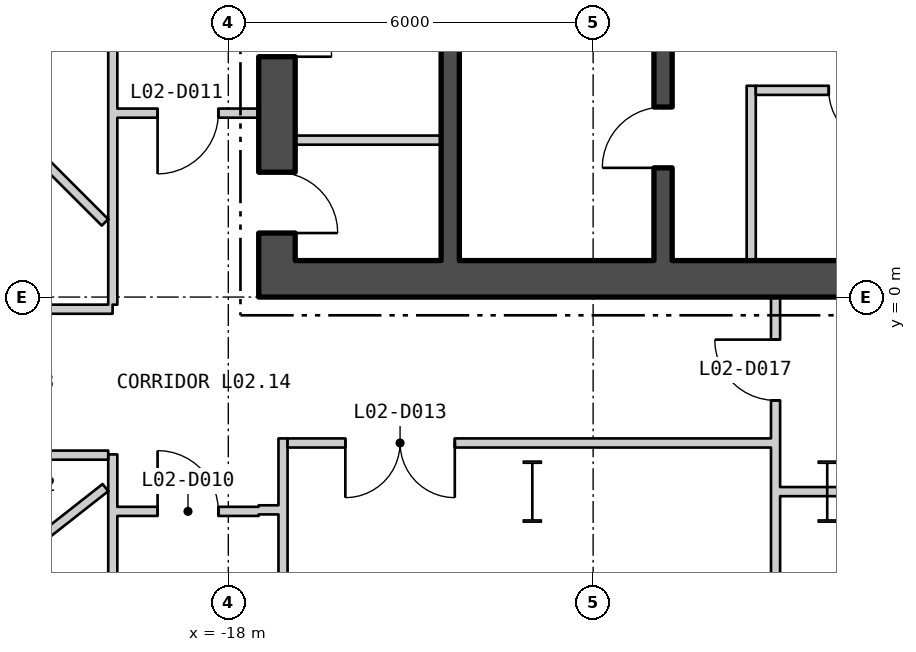
"""IFC4 building model, lengths in metres.
Left out: names, types, materials, properties, quantities, classifications, styles, units other than length and angle.
Written with IfcOpenShell. Run it as: python <this file> out.ifc"""

import sys

from ifc_helpers import new_model, si_unit, direction, frame, frame_2d, origin, origin_2d, place, context, subcontext, project, spatial, rectangle, i_section, extrude, element, fill, save


model = new_model("IFC4")
c1 = context("Model", 3, precision=1e-05, world=origin(), true_north=direction((0.0, 1.0)))
c2 = subcontext(c1, "Body", "Model", "MODEL_VIEW")
j1 = project(units=[si_unit("LENGTHUNIT", "METRE"), si_unit("PLANEANGLEUNIT", "RADIAN")], contexts=[c1])
p1 = place(None, origin())
s1 = spatial("IfcSite", under=j1, at=p1, CompositionType="ELEMENT")
p2 = place(p1, origin())
s2 = spatial("IfcBuilding", under=s1, at=p2, CompositionType="ELEMENT")
p3 = place(p2, frame((0.0, 0.0, 13.5)))
s3 = spatial("IfcBuildingStorey", under=s2, at=p3, CompositionType="ELEMENT", Elevation=13.5)
for number, where, z_axis, x_axis in (
    (1, (-8.15, -3.2, 0.0), (0.0, 0.0, 1.0), (1.0, 0.0, 0.0)),
    (2, (-13.0, -3.2, 0.0), (0.0, 0.0, 1.0), (1.0, 0.0, 0.0)),
):
    element("IfcColumn", number, at=place(p3, frame(where, z_axis=z_axis, x_axis=x_axis)), inside=s3, PredefinedType="COLUMN", context=c2, shape_type="SweptSolid", body=[
        extrude(i_section(OverallWidth=0.302, OverallDepth=1.008, WebThickness=0.021, FlangeThickness=0.04, at=origin_2d()), origin(), (0.0, 0.0, 1.0), 5.1),
    ])
p4 = place(p3, frame((-17.5, 0.3, 0.0), z_axis=(0.0, 0.0, 1.0), x_axis=(1.0, 0.0, 0.0)))
e3 = element("IfcWall", 3, at=p4, inside=s3, PredefinedType="SHEAR", context=c2, shape_type="SweptSolid", body=[
    extrude(rectangle(XDim=35.0, YDim=0.6, at=frame_2d((17.5, 0.0))), origin(), (0.0, 0.0, 1.0), 4.88),
])
p5 = place(p4, frame((12.0, 0.0, 0.0)))
e4 = element("IfcOpeningElement", 4, at=p5, cuts=e3, PredefinedType="OPENING", context=c2, shape_type="SweptSolid", body=[
    extrude(rectangle(XDim=1.8, YDim=2.4, at=frame_2d((0.9, 1.2))), frame((0.0, 0.31, 0.0), z_axis=(0.0, -1.0, 0.0), x_axis=(1.0, 0.0, 0.0)), (0.0, 0.0, 1.0), 0.62),
])
p6 = place(p4, frame((22.0, 0.0, 0.0)))
e5 = element("IfcOpeningElement", 5, at=p6, cuts=e3, PredefinedType="OPENING", context=c2, shape_type="SweptSolid", body=[
    extrude(rectangle(XDim=1.8, YDim=2.4, at=frame_2d((0.9, 1.2))), frame((0.0, 0.31, 0.0), z_axis=(0.0, -1.0, 0.0), x_axis=(1.0, 0.0, 0.0)), (0.0, 0.0, 1.0), 0.62),
])
p7 = place(p3, frame((-17.2, 0.6, 0.0), z_axis=(0.0, 0.0, 1.0), x_axis=(0.0, 1.0, 0.0)))
e6 = element("IfcWall", 6, at=p7, inside=s3, PredefinedType="SHEAR", context=c2, shape_type="SweptSolid", body=[
    extrude(rectangle(XDim=16.8, YDim=0.6, at=frame_2d((8.4, 0.0))), origin(), (0.0, 0.0, 1.0), 4.88),
])
p8 = place(p7, frame((5.7, 0.0, 0.0)))
e7 = element("IfcOpeningElement", 7, at=p8, cuts=e6, PredefinedType="OPENING", context=c2, shape_type="SweptSolid", body=[
    extrude(rectangle(XDim=1.5, YDim=2.1, at=frame_2d((0.75, 1.05))), frame((0.0, 0.31, 0.0), z_axis=(0.0, -1.0, 0.0), x_axis=(1.0, 0.0, 0.0)), (0.0, 0.0, 1.0), 0.62),
])
p9 = place(p7, frame((0.453, 0.0, 0.0)))
e8 = element("IfcOpeningElement", 8, at=p9, cuts=e6, PredefinedType="OPENING", context=c2, shape_type="SweptSolid", body=[
    extrude(rectangle(XDim=1.0, YDim=2.1, at=frame_2d((0.5, 1.05))), frame((0.0, 0.31, 0.0), z_axis=(0.0, -1.0, 0.0), x_axis=(1.0, 0.0, 0.0)), (0.0, 0.0, 1.0), 0.62),
])
p10 = place(p7, frame((3.353, 0.0, 0.0)))
e9 = element("IfcOpeningElement", 9, at=p10, cuts=e6, PredefinedType="OPENING", context=c2, shape_type="SweptSolid", body=[
    extrude(rectangle(XDim=0.9, YDim=2.1, at=frame_2d((0.45, 1.05))), frame((0.0, 0.31, 0.0), z_axis=(0.0, -1.0, 0.0), x_axis=(1.0, 0.0, 0.0)), (0.0, 0.0, 1.0), 0.62),
])
p11 = place(p7, frame((7.886, 0.0, 0.0)))
e10 = element("IfcOpeningElement", 10, at=p11, cuts=e6, PredefinedType="OPENING", context=c2, shape_type="SweptSolid", body=[
    extrude(rectangle(XDim=0.9, YDim=2.1, at=frame_2d((0.45, 1.05))), frame((0.0, 0.31, 0.0), z_axis=(0.0, -1.0, 0.0), x_axis=(1.0, 0.0, 0.0)), (0.0, 0.0, 1.0), 0.62),
])
p12 = place(p7, frame((12.686, 0.0, 0.0)))
e11 = element("IfcOpeningElement", 11, at=p12, cuts=e6, PredefinedType="OPENING", context=c2, shape_type="SweptSolid", body=[
    extrude(rectangle(XDim=0.9, YDim=2.1, at=frame_2d((0.45, 1.05))), frame((0.0, 0.31, 0.0), z_axis=(0.0, -1.0, 0.0), x_axis=(1.0, 0.0, 0.0)), (0.0, 0.0, 1.0), 0.62),
])
p13 = place(p3, frame((-10.85, 0.6, 0.0), z_axis=(0.0, 0.0, 1.0), x_axis=(0.0, 1.0, 0.0)))
e12 = element("IfcWall", 12, at=p13, inside=s3, PredefinedType="SHEAR", context=c2, shape_type="SweptSolid", body=[
    extrude(rectangle(XDim=16.8, YDim=0.3, at=frame_2d((8.4, 0.0))), origin(), (0.0, 0.0, 1.0), 4.88),
])
p14 = place(p13, frame((5.075, 0.0, 0.0)))
e13 = element("IfcOpeningElement", 13, at=p14, cuts=e12, PredefinedType="OPENING", context=c2, shape_type="SweptSolid", body=[
    extrude(rectangle(XDim=1.25, YDim=2.1, at=frame_2d((0.625, 1.05))), frame((0.0, 0.16, 0.0), z_axis=(0.0, -1.0, 0.0), x_axis=(1.0, 0.0, 0.0)), (0.0, 0.0, 1.0), 0.32),
])
p15 = place(p13, frame((1.525, 0.0, 0.0)))
e14 = element("IfcOpeningElement", 14, at=p15, cuts=e12, PredefinedType="OPENING", context=c2, shape_type="SweptSolid", body=[
    extrude(rectangle(XDim=1.0, YDim=2.1, at=frame_2d((0.5, 1.05))), frame((0.0, 0.16, 0.0), z_axis=(0.0, -1.0, 0.0), x_axis=(1.0, 0.0, 0.0)), (0.0, 0.0, 1.0), 0.32),
])
p16 = place(p3, frame((-14.35, 0.6, 0.0), z_axis=(0.0, 0.0, 1.0), x_axis=(0.0, 1.0, 0.0)))
e15 = element("IfcWall", 15, at=p16, inside=s3, PredefinedType="SHEAR", context=c2, shape_type="SweptSolid", body=[
    extrude(rectangle(XDim=16.8, YDim=0.3, at=frame_2d((8.4, 0.0))), origin(), (0.0, 0.0, 1.0), 4.88),
])
p17 = place(p16, frame((5.7, 0.0, 0.0)))
e16 = element("IfcOpeningElement", 16, at=p17, cuts=e15, PredefinedType="OPENING", context=c2, shape_type="SweptSolid", body=[
    extrude(rectangle(XDim=1.5, YDim=2.1, at=frame_2d((0.75, 1.05))), frame((0.0, 0.16, 0.0), z_axis=(0.0, -1.0, 0.0), x_axis=(1.0, 0.0, 0.0)), (0.0, 0.0, 1.0), 0.32),
])
p18 = place(p3, frame((-16.9, 2.581, 0.0), z_axis=(0.0, 0.0, 1.0), x_axis=(1.0, 0.0, 0.0)))
e17 = element("IfcWall", 17, at=p18, inside=s3, PredefinedType="PARTITIONING", context=c2, shape_type="SweptSolid", body=[
    extrude(rectangle(XDim=2.4, YDim=0.15, at=frame_2d((1.2, 0.0))), origin(), (0.0, 0.0, 1.0), 4.88),
])
p19 = place(p3, frame((-9.4, 0.6, 0.0), z_axis=(0.0, 0.0, 1.0), x_axis=(0.0, 1.0, 0.0)))
e18 = element("IfcWall", 18, at=p19, inside=s3, PredefinedType="PARTITIONING", context=c2, shape_type="SweptSolid", body=[
    extrude(rectangle(XDim=2.875, YDim=0.15, at=frame_2d((1.438, 0.0))), origin(), (0.0, 0.0, 1.0), 4.88),
])
p20 = place(p3, frame((-9.325, 3.4, 0.0), z_axis=(0.0, 0.0, 1.0), x_axis=(1.0, 0.0, 0.0)))
e19 = element("IfcWall", 19, at=p20, inside=s3, PredefinedType="PARTITIONING", context=c2, shape_type="SweptSolid", body=[
    extrude(rectangle(XDim=3.3, YDim=0.15, at=frame_2d((1.65, 0.0))), origin(), (0.0, 0.0, 1.0), 4.88),
])
p21 = place(p20, frame((1.2, 0.0, 0.0)))
e20 = element("IfcOpeningElement", 20, at=p21, cuts=e19, PredefinedType="OPENING", context=c2, shape_type="SweptSolid", body=[
    extrude(rectangle(XDim=0.9, YDim=2.1, at=frame_2d((0.45, 1.05))), frame((0.0, 0.085, 0.0), z_axis=(0.0, -1.0, 0.0), x_axis=(1.0, 0.0, 0.0)), (0.0, 0.0, 1.0), 0.17),
])
p22 = place(p3, frame((-26.75, -2.6, 0.0), z_axis=(0.0, 0.0, 1.0), x_axis=(1.0, 0.0, 0.0)))
e21 = element("IfcWall", 21, at=p22, inside=s3, PredefinedType="PARTITIONING", context=c2, shape_type="SweptSolid", body=[
    extrude(rectangle(XDim=6.775, YDim=0.15, at=frame_2d((3.388, 0.0))), origin(), (0.0, 0.0, 1.0), 4.88),
])
p23 = place(p22, frame((1.616, 0.0, 0.0)))
e22 = element("IfcOpeningElement", 22, at=p23, cuts=e21, PredefinedType="OPENING", context=c2, shape_type="SweptSolid", body=[
    extrude(rectangle(XDim=1.0, YDim=2.1, at=frame_2d((0.5, 1.05))), frame((0.0, 0.085, 0.0), z_axis=(0.0, -1.0, 0.0), x_axis=(1.0, 0.0, 0.0)), (0.0, 0.0, 1.0), 0.17),
])
p24 = place(p22, frame((4.658, 0.0, 0.0)))
e23 = element("IfcOpeningElement", 23, at=p24, cuts=e21, PredefinedType="OPENING", context=c2, shape_type="SweptSolid", body=[
    extrude(rectangle(XDim=1.0, YDim=2.1, at=frame_2d((0.5, 1.05))), frame((0.0, 0.085, 0.0), z_axis=(0.0, -1.0, 0.0), x_axis=(1.0, 0.0, 0.0)), (0.0, 0.0, 1.0), 0.17),
])
p25 = place(p3, frame((-25.425, -0.2, 0.0), z_axis=(0.0, 0.0, 1.0), x_axis=(1.0, 0.0, 0.0)))
e24 = element("IfcWall", 24, at=p25, inside=s3, PredefinedType="PARTITIONING", context=c2, shape_type="SweptSolid", body=[
    extrude(rectangle(XDim=5.522, YDim=0.15, at=frame_2d((2.761, 0.0))), origin(), (0.0, 0.0, 1.0), 4.88),
])
p26 = place(p25, frame((2.666, 0.0, 0.0)))
e25 = element("IfcOpeningElement", 25, at=p26, cuts=e24, PredefinedType="OPENING", context=c2, shape_type="SweptSolid", body=[
    extrude(rectangle(XDim=1.8, YDim=2.1, at=frame_2d((0.9, 1.05))), frame((0.0, 0.085, 0.0), z_axis=(0.0, -1.0, 0.0), x_axis=(1.0, 0.0, 0.0)), (0.0, 0.0, 1.0), 0.17),
])
p27 = place(p3, frame((-25.392, 6.592, 0.0), z_axis=(0.0, 0.0, 1.0), x_axis=(0.707106781187, -0.707106781187, 0.0)))
e26 = element("IfcWall", 26, at=p27, inside=s3, PredefinedType="PARTITIONING", context=c2, shape_type="SweptSolid", body=[
    extrude(rectangle(XDim=7.586, YDim=0.15, at=frame_2d((3.793, 0.0))), origin(), (0.0, 0.0, 1.0), 4.88),
])
p28 = place(p3, frame((-24.745, -6.846, 0.0), z_axis=(0.0, 0.0, 1.0), x_axis=(0.786295235231, 0.617850955372, 0.0)))
e27 = element("IfcWall", 27, at=p28, inside=s3, PredefinedType="PARTITIONING", context=c2, shape_type="SweptSolid", body=[
    extrude(rectangle(XDim=6.008, YDim=0.15, at=frame_2d((3.004, 0.0))), origin(), (0.0, 0.0, 1.0), 4.88),
])
p29 = place(p3, frame((-19.9, -23.775, 0.0), z_axis=(0.0, 0.0, 1.0), x_axis=(0.0, 1.0, 0.0)))
e28 = element("IfcWall", 28, at=p29, inside=s3, PredefinedType="PARTITIONING", context=c2, shape_type="SweptSolid", body=[
    extrude(rectangle(XDim=21.187, YDim=0.15, at=frame_2d((10.594, 0.0))), origin(), (0.0, 0.0, 1.0), 4.88),
])
p30 = place(p29, frame((3.898, 0.0, 0.0)))
e29 = element("IfcOpeningElement", 29, at=p30, cuts=e28, PredefinedType="OPENING", context=c2, shape_type="SweptSolid", body=[
    extrude(rectangle(XDim=1.0, YDim=2.1, at=frame_2d((0.5, 1.05))), frame((0.0, 0.085, 0.0), z_axis=(0.0, -1.0, 0.0), x_axis=(1.0, 0.0, 0.0)), (0.0, 0.0, 1.0), 0.17),
])
p31 = place(p29, frame((10.832, 0.0, 0.0)))
e30 = element("IfcOpeningElement", 30, at=p31, cuts=e28, PredefinedType="OPENING", context=c2, shape_type="SweptSolid", body=[
    extrude(rectangle(XDim=1.0, YDim=2.1, at=frame_2d((0.5, 1.05))), frame((0.0, 0.085, 0.0), z_axis=(0.0, -1.0, 0.0), x_axis=(1.0, 0.0, 0.0)), (0.0, 0.0, 1.0), 0.17),
])
p32 = place(p29, frame((14.688, 0.0, 0.0)))
e31 = element("IfcOpeningElement", 31, at=p32, cuts=e28, PredefinedType="OPENING", context=c2, shape_type="SweptSolid", body=[
    extrude(rectangle(XDim=1.0, YDim=2.1, at=frame_2d((0.5, 1.05))), frame((0.0, 0.085, 0.0), z_axis=(0.0, -1.0, 0.0), x_axis=(1.0, 0.0, 0.0)), (0.0, 0.0, 1.0), 0.17),
])
p33 = place(p3, frame((-19.9, -0.125, 0.0), z_axis=(0.0, 0.0, 1.0), x_axis=(0.0, 1.0, 0.0)))
e32 = element("IfcWall", 32, at=p33, inside=s3, PredefinedType="PARTITIONING", context=c2, shape_type="SweptSolid", body=[
    extrude(rectangle(XDim=1.15, YDim=0.15, at=frame_2d((0.575, 0.0))), origin(), (0.0, 0.0, 1.0), 4.88),
])
p34 = place(p3, frame((-19.9, 1.025, 0.0), z_axis=(0.0, 0.0, 1.0), x_axis=(0.0, 1.0, 0.0)))
e33 = element("IfcWall", 33, at=p34, inside=s3, PredefinedType="PARTITIONING", context=c2, shape_type="SweptSolid", body=[
    extrude(rectangle(XDim=16.9, YDim=0.15, at=frame_2d((8.45, 0.0))), origin(), (0.0, 0.0, 1.0), 4.88),
])
p35 = place(p34, frame((8.644, 0.0, 0.0)))
e34 = element("IfcOpeningElement", 34, at=p35, cuts=e33, PredefinedType="OPENING", context=c2, shape_type="SweptSolid", body=[
    extrude(rectangle(XDim=1.0, YDim=2.1, at=frame_2d((0.5, 1.05))), frame((0.0, 0.085, 0.0), z_axis=(0.0, -1.0, 0.0), x_axis=(1.0, 0.0, 0.0)), (0.0, 0.0, 1.0), 0.17),
])
p36 = place(p34, frame((15.7, 0.0, 0.0)))
e35 = element("IfcOpeningElement", 35, at=p36, cuts=e33, PredefinedType="OPENING", context=c2, shape_type="SweptSolid", body=[
    extrude(rectangle(XDim=1.0, YDim=2.1, at=frame_2d((0.5, 1.05))), frame((0.0, 0.085, 0.0), z_axis=(0.0, -1.0, 0.0), x_axis=(1.0, 0.0, 0.0)), (0.0, 0.0, 1.0), 0.17),
])
p37 = place(p3, frame((-19.825, -3.525, 0.0), z_axis=(0.0, 0.0, 1.0), x_axis=(1.0, 0.0, 0.0)))
e36 = element("IfcWall", 36, at=p37, inside=s3, PredefinedType="PARTITIONING", context=c2, shape_type="SweptSolid", body=[
    extrude(rectangle(XDim=2.325, YDim=0.15, at=frame_2d((1.163, 0.0))), origin(), (0.0, 0.0, 1.0), 4.88),
])
p38 = place(p37, frame((0.662, 0.0, 0.0)))
e37 = element("IfcOpeningElement", 37, at=p38, cuts=e36, PredefinedType="OPENING", context=c2, shape_type="SweptSolid", body=[
    extrude(rectangle(XDim=1.0, YDim=2.1, at=frame_2d((0.5, 1.05))), frame((0.0, 0.085, 0.0), z_axis=(0.0, -1.0, 0.0), x_axis=(1.0, 0.0, 0.0)), (0.0, 0.0, 1.0), 0.17),
])
p39 = place(p3, frame((-19.825, 3.025, 0.0), z_axis=(0.0, 0.0, 1.0), x_axis=(1.0, 0.0, 0.0)))
e38 = element("IfcWall", 38, at=p39, inside=s3, PredefinedType="PARTITIONING", context=c2, shape_type="SweptSolid", body=[
    extrude(rectangle(XDim=2.325, YDim=0.15, at=frame_2d((1.163, 0.0))), origin(), (0.0, 0.0, 1.0), 4.33),
])
p40 = place(p39, frame((0.662, 0.0, 0.0)))
e39 = element("IfcOpeningElement", 39, at=p40, cuts=e38, PredefinedType="OPENING", context=c2, shape_type="SweptSolid", body=[
    extrude(rectangle(XDim=1.0, YDim=2.1, at=frame_2d((0.5, 1.05))), frame((0.0, 0.085, 0.0), z_axis=(0.0, -1.0, 0.0), x_axis=(1.0, 0.0, 0.0)), (0.0, 0.0, 1.0), 0.17),
])
p41 = place(p3, frame((-17.5, -3.5, 0.0), z_axis=(0.0, 0.0, 1.0), x_axis=(1.0, 0.0, 0.0)))
e40 = element("IfcWall", 40, at=p41, inside=s3, PredefinedType="PARTITIONING", context=c2, shape_type="SweptSolid", body=[
    extrude(rectangle(XDim=0.325, YDim=0.15, at=frame_2d((0.163, 0.0))), origin(), (0.0, 0.0, 1.0), 4.88),
])
p42 = place(p3, frame((-17.1, -21.375, 0.0), z_axis=(0.0, 0.0, 1.0), x_axis=(0.0, 1.0, 0.0)))
e41 = element("IfcWall", 41, at=p42, inside=s3, PredefinedType="PARTITIONING", context=c2, shape_type="SweptSolid", body=[
    extrude(rectangle(XDim=19.05, YDim=0.15, at=frame_2d((9.525, 0.0))), origin(), (0.0, 0.0, 1.0), 4.88),
])
p43 = place(p3, frame((-17.025, -2.4, 0.0), z_axis=(0.0, 0.0, 1.0), x_axis=(1.0, 0.0, 0.0)))
e42 = element("IfcWall", 42, at=p43, inside=s3, PredefinedType="PARTITIONING", context=c2, shape_type="SweptSolid", body=[
    extrude(rectangle(XDim=7.95, YDim=0.15, at=frame_2d((3.975, 0.0))), origin(), (0.0, 0.0, 1.0), 4.88),
])
p44 = place(p43, frame((0.95, 0.0, 0.0)))
e43 = element("IfcOpeningElement", 43, at=p44, cuts=e42, PredefinedType="OPENING", context=c2, shape_type="SweptSolid", body=[
    extrude(rectangle(XDim=1.8, YDim=2.1, at=frame_2d((0.9, 1.05))), frame((0.0, 0.085, 0.0), z_axis=(0.0, -1.0, 0.0), x_axis=(1.0, 0.0, 0.0)), (0.0, 0.0, 1.0), 0.17),
])
p45 = place(p3, frame((-9.0, -13.675, 0.0), z_axis=(0.0, 0.0, 1.0), x_axis=(0.0, 1.0, 0.0)))
e44 = element("IfcWall", 44, at=p45, inside=s3, PredefinedType="PARTITIONING", context=c2, shape_type="SweptSolid", body=[
    extrude(rectangle(XDim=13.675, YDim=0.15, at=frame_2d((6.838, 0.0))), origin(), (0.0, 0.0, 1.0), 4.88),
])
p46 = place(p45, frame((11.975, 0.0, 0.0)))
e45 = element("IfcOpeningElement", 45, at=p46, cuts=e44, PredefinedType="OPENING", context=c2, shape_type="SweptSolid", body=[
    extrude(rectangle(XDim=1.0, YDim=2.1, at=frame_2d((0.5, 1.05))), frame((0.0, 0.085, 0.0), z_axis=(0.0, -1.0, 0.0), x_axis=(1.0, 0.0, 0.0)), (0.0, 0.0, 1.0), 0.17),
])
p47 = place(p3, frame((-8.925, -3.2, 0.0), z_axis=(0.0, 0.0, 1.0), x_axis=(1.0, 0.0, 0.0)))
e46 = element("IfcWall", 46, at=p47, inside=s3, PredefinedType="PARTITIONING", context=c2, shape_type="SweptSolid", body=[
    extrude(rectangle(XDim=0.775, YDim=0.15, at=frame_2d((0.388, 0.0))), origin(), (0.0, 0.0, 1.0), 4.09),
])
p48 = place(p3, frame((-8.15, -3.2, 0.0), z_axis=(0.0, 0.0, 1.0), x_axis=(1.0, 0.0, 0.0)))
e47 = element("IfcWall", 47, at=p48, inside=s3, PredefinedType="PARTITIONING", context=c2, shape_type="SweptSolid", body=[
    extrude(rectangle(XDim=2.225, YDim=0.15, at=frame_2d((1.113, 0.0))), origin(), (0.0, 0.0, 1.0), 3.97),
])
p49 = place(p48, frame((0.513, 0.0, 0.0)))
e48 = element("IfcOpeningElement", 48, at=p49, cuts=e47, PredefinedType="OPENING", context=c2, shape_type="SweptSolid", body=[
    extrude(rectangle(XDim=1.0, YDim=2.1, at=frame_2d((0.5, 1.05))), frame((0.0, 0.085, 0.0), z_axis=(0.0, -1.0, 0.0), x_axis=(1.0, 0.0, 0.0)), (0.0, 0.0, 1.0), 0.17),
])
p50 = place(p15, origin())
e49 = element("IfcDoor", 49, at=p50, inside=s3, OperationType="SINGLE_SWING_RIGHT", PredefinedType="DOOR", context=c2, shape_type="SweptSolid", body=[
    extrude(rectangle(XDim=1.0, YDim=2.1, at=frame_2d((0.5, 1.05))), frame((0.0, 0.025, 0.0), z_axis=(0.0, -1.0, 0.0), x_axis=(1.0, 0.0, 0.0)), (0.0, 0.0, 1.0), 0.05),
])
fill(e14, e49)
p51 = place(p9, origin())
e50 = element("IfcDoor", 50, at=p51, inside=s3, OperationType="SINGLE_SWING_LEFT", PredefinedType="DOOR", context=c2, shape_type="SweptSolid", body=[
    extrude(rectangle(XDim=1.0, YDim=2.1, at=frame_2d((0.5, 1.05))), frame((0.0, 0.025, 0.0), z_axis=(0.0, -1.0, 0.0), x_axis=(1.0, 0.0, 0.0)), (0.0, 0.0, 1.0), 0.05),
])
fill(e8, e50)
p52 = place(p10, origin())
e51 = element("IfcDoor", 51, at=p52, inside=s3, OperationType="SINGLE_SWING_LEFT", PredefinedType="DOOR", context=c2, shape_type="SweptSolid", body=[
    extrude(rectangle(XDim=0.9, YDim=2.1, at=frame_2d((0.45, 1.05))), frame((0.0, 0.025, 0.0), z_axis=(0.0, -1.0, 0.0), x_axis=(1.0, 0.0, 0.0)), (0.0, 0.0, 1.0), 0.05),
])
fill(e9, e51)
p53 = place(p21, origin())
e52 = element("IfcDoor", 52, at=p53, inside=s3, OperationType="SINGLE_SWING_RIGHT", PredefinedType="DOOR", context=c2, shape_type="SweptSolid", body=[
    extrude(rectangle(XDim=0.9, YDim=2.1, at=frame_2d((0.45, 1.05))), frame((0.0, 0.025, 0.0), z_axis=(0.0, -1.0, 0.0), x_axis=(1.0, 0.0, 0.0)), (0.0, 0.0, 1.0), 0.05),
])
fill(e20, e52)
p54 = place(p38, origin())
e53 = element("IfcDoor", 53, at=p54, inside=s3, OperationType="SINGLE_SWING_RIGHT", PredefinedType="DOOR", context=c2, shape_type="SweptSolid", body=[
    extrude(rectangle(XDim=1.0, YDim=2.1, at=frame_2d((0.5, 1.05))), frame((0.0, 0.025, 0.0), z_axis=(0.0, -1.0, 0.0), x_axis=(1.0, 0.0, 0.0)), (0.0, 0.0, 1.0), 0.05),
])
fill(e37, e53)
p55 = place(p40, origin())
e54 = element("IfcDoor", 54, at=p55, inside=s3, OperationType="SINGLE_SWING_LEFT", PredefinedType="DOOR", context=c2, shape_type="SweptSolid", body=[
    extrude(rectangle(XDim=1.0, YDim=2.1, at=frame_2d((0.5, 1.05))), frame((0.0, 0.025, 0.0), z_axis=(0.0, -1.0, 0.0), x_axis=(1.0, 0.0, 0.0)), (0.0, 0.0, 1.0), 0.05),
])
fill(e39, e54)
p56 = place(p44, origin())
e55 = element("IfcDoor", 55, at=p56, inside=s3, OperationType="DOUBLE_DOOR_SINGLE_SWING", PredefinedType="DOOR", context=c2, shape_type="SweptSolid", body=[
    extrude(rectangle(XDim=1.8, YDim=2.1, at=frame_2d((0.9, 1.05))), frame((0.0, 0.025, 0.0), z_axis=(0.0, -1.0, 0.0), x_axis=(1.0, 0.0, 0.0)), (0.0, 0.0, 1.0), 0.05),
])
fill(e43, e55)
p57 = place(p46, origin())
e56 = element("IfcDoor", 56, at=p57, inside=s3, OperationType="SINGLE_SWING_LEFT", PredefinedType="DOOR", context=c2, shape_type="SweptSolid", body=[
    extrude(rectangle(XDim=1.0, YDim=2.1, at=frame_2d((0.5, 1.05))), frame((0.0, 0.025, 0.0), z_axis=(0.0, -1.0, 0.0), x_axis=(1.0, 0.0, 0.0)), (0.0, 0.0, 1.0), 0.05),
])
fill(e45, e56)
save(model, sys.argv[1])
